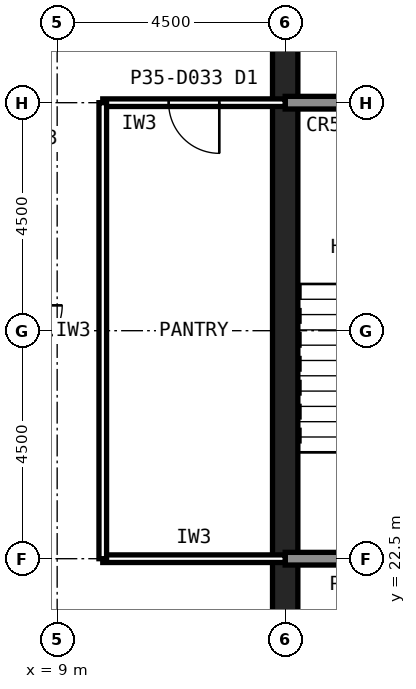
"""IFC4 building model, lengths in metres.
Left out: names, types, materials, properties, quantities, classifications, styles, units other than length and angle.
Written with IfcOpenShell. Run it as: python <this file> out.ifc"""

import sys

from ifc_helpers import new_model, si_unit, direction, frame, frame_2d, origin, place, context, subcontext, project, spatial, rectangle, extrude, element, fill, save


model = new_model("IFC4")
c1 = context("Model", 3, precision=1e-05, world=origin(), true_north=direction((0.0, 1.0)))
c2 = subcontext(c1, "Body", "Model", "MODEL_VIEW")
j1 = project(units=[si_unit("LENGTHUNIT", "METRE"), si_unit("PLANEANGLEUNIT", "RADIAN")], contexts=[c1])
p1 = place(None, origin())
s1 = spatial("IfcSite", under=j1, at=p1, CompositionType="ELEMENT")
p2 = place(p1, origin())
s2 = spatial("IfcBuilding", under=s1, at=p2, CompositionType="ELEMENT")
p3 = place(p2, frame((0.0, 0.0, 151.6)))
s3 = spatial("IfcBuildingStorey", under=s2, at=p3, CompositionType="ELEMENT", Elevation=151.6)
p4 = place(p3, frame((13.5, 40.5, 0.0), z_axis=(0.0, 0.0, 1.0), x_axis=(0.0, -1.0, 0.0)))
e1 = element("IfcWall", 1, at=p4, inside=s3, PredefinedType="SHEAR", context=c2, shape_type="SweptSolid", body=[
    extrude(rectangle(XDim=27.0, YDim=0.5, at=frame_2d((13.5, 0.0))), origin(), (0.0, 0.0, 1.0), 4.0),
])
p5 = place(p4, frame((19.65, 0.0, 0.0)))
e2 = element("IfcOpeningElement", 2, at=p5, cuts=e1, PredefinedType="OPENING", context=c2, shape_type="SweptSolid", body=[
    extrude(rectangle(XDim=1.2, YDim=2.1, at=frame_2d((0.6, 1.05))), frame((0.0, 0.26, 0.0), z_axis=(0.0, -1.0, 0.0), x_axis=(1.0, 0.0, 0.0)), (0.0, 0.0, 1.0), 0.52),
])
p6 = place(p4, frame((5.85, 0.0, 0.0)))
e3 = element("IfcOpeningElement", 3, at=p6, cuts=e1, PredefinedType="OPENING", context=c2, shape_type="SweptSolid", body=[
    extrude(rectangle(XDim=1.8, YDim=2.1, at=frame_2d((0.9, 1.05))), frame((0.0, 0.26, 0.0), z_axis=(0.0, -1.0, 0.0), x_axis=(1.0, 0.0, 0.0)), (0.0, 0.0, 1.0), 0.52),
])
p7 = place(p3, frame((13.5, 22.5, 0.0), z_axis=(0.0, 0.0, 1.0), x_axis=(1.0, 0.0, 0.0)))
e4 = element("IfcWall", 4, at=p7, inside=s3, PredefinedType="SOLIDWALL", context=c2, shape_type="SweptSolid", body=[
    extrude(rectangle(XDim=27.0, YDim=0.25, at=frame_2d((13.5, 0.0))), origin(), (0.0, 0.0, 1.0), 3.84),
])
p8 = place(p7, frame((1.65, 0.0, 0.0)))
e5 = element("IfcOpeningElement", 5, at=p8, cuts=e4, PredefinedType="OPENING", context=c2, shape_type="SweptSolid", body=[
    extrude(rectangle(XDim=1.2, YDim=2.1, at=frame_2d((0.6, 1.05))), frame((0.0, 0.135, 0.0), z_axis=(0.0, -1.0, 0.0), x_axis=(1.0, 0.0, 0.0)), (0.0, 0.0, 1.0), 0.27),
])
p9 = place(p7, frame((6.025, 0.0, 0.0)))
e6 = element("IfcOpeningElement", 6, at=p9, cuts=e4, PredefinedType="OPENING", context=c2, shape_type="SweptSolid", body=[
    extrude(rectangle(XDim=1.0, YDim=2.1, at=frame_2d((0.5, 1.05))), frame((0.0, 0.135, 0.0), z_axis=(0.0, -1.0, 0.0), x_axis=(1.0, 0.0, 0.0)), (0.0, 0.0, 1.0), 0.27),
])
p10 = place(p7, frame((10.525, 0.0, 0.0)))
e7 = element("IfcOpeningElement", 7, at=p10, cuts=e4, PredefinedType="OPENING", context=c2, shape_type="SweptSolid", body=[
    extrude(rectangle(XDim=1.0, YDim=2.1, at=frame_2d((0.5, 1.05))), frame((0.0, 0.135, 0.0), z_axis=(0.0, -1.0, 0.0), x_axis=(1.0, 0.0, 0.0)), (0.0, 0.0, 1.0), 0.27),
])
p11 = place(p7, frame((19.75, 0.0, 0.0)))
e8 = element("IfcOpeningElement", 8, at=p11, cuts=e4, PredefinedType="OPENING", context=c2, shape_type="SweptSolid", body=[
    extrude(rectangle(XDim=1.0, YDim=2.1, at=frame_2d((0.5, 1.05))), frame((0.0, 0.135, 0.0), z_axis=(0.0, -1.0, 0.0), x_axis=(1.0, 0.0, 0.0)), (0.0, 0.0, 1.0), 0.27),
])
p12 = place(p7, frame((15.05, 0.0, 0.0)))
e9 = element("IfcOpeningElement", 9, at=p12, cuts=e4, PredefinedType="OPENING", context=c2, shape_type="SweptSolid", body=[
    extrude(rectangle(XDim=1.4, YDim=2.4, at=frame_2d((0.7, 1.2))), frame((0.0, 0.135, 0.0), z_axis=(0.0, -1.0, 0.0), x_axis=(1.0, 0.0, 0.0)), (0.0, 0.0, 1.0), 0.27),
])
p13 = place(p3, frame((13.5, 31.5, 0.0), z_axis=(0.0, 0.0, 1.0), x_axis=(1.0, 0.0, 0.0)))
e10 = element("IfcWall", 10, at=p13, inside=s3, PredefinedType="SOLIDWALL", context=c2, shape_type="SweptSolid", body=[
    extrude(rectangle(XDim=27.0, YDim=0.25, at=frame_2d((13.5, 0.0))), origin(), (0.0, 0.0, 1.0), 3.84),
])
p14 = place(p13, frame((24.15, 0.0, 0.0)))
e11 = element("IfcOpeningElement", 11, at=p14, cuts=e10, PredefinedType="OPENING", context=c2, shape_type="SweptSolid", body=[
    extrude(rectangle(XDim=1.2, YDim=2.1, at=frame_2d((0.6, 1.05))), frame((0.0, 0.135, 0.0), z_axis=(0.0, -1.0, 0.0), x_axis=(1.0, 0.0, 0.0)), (0.0, 0.0, 1.0), 0.27),
])
p15 = place(p13, frame((15.3, 0.0, 0.0)))
e12 = element("IfcOpeningElement", 12, at=p15, cuts=e10, PredefinedType="OPENING", context=c2, shape_type="SweptSolid", body=[
    extrude(rectangle(XDim=0.9, YDim=2.1, at=frame_2d((0.45, 1.05))), frame((0.0, 0.135, 0.0), z_axis=(0.0, -1.0, 0.0), x_axis=(1.0, 0.0, 0.0)), (0.0, 0.0, 1.0), 0.27),
])
p16 = place(p13, frame((19.8, 0.0, 0.0)))
e13 = element("IfcOpeningElement", 13, at=p16, cuts=e10, PredefinedType="OPENING", context=c2, shape_type="SweptSolid", body=[
    extrude(rectangle(XDim=0.9, YDim=2.1, at=frame_2d((0.45, 1.05))), frame((0.0, 0.135, 0.0), z_axis=(0.0, -1.0, 0.0), x_axis=(1.0, 0.0, 0.0)), (0.0, 0.0, 1.0), 0.27),
])
p17 = place(p3, frame((9.9, 22.5, 0.0), z_axis=(0.0, 0.0, 1.0), x_axis=(1.0, 0.0, 0.0)))
e14 = element("IfcWall", 14, at=p17, inside=s3, PredefinedType="PARTITIONING", context=c2, shape_type="SweptSolid", body=[
    extrude(rectangle(XDim=3.6, YDim=0.15, at=frame_2d((1.8, 0.0))), origin(), (0.0, 0.0, 1.0), 2.989),
])
p18 = place(p3, frame((13.5, 31.5, 0.0), z_axis=(0.0, 0.0, 1.0), x_axis=(-1.0, 0.0, 0.0)))
e15 = element("IfcWall", 15, at=p18, inside=s3, PredefinedType="PARTITIONING", context=c2, shape_type="SweptSolid", body=[
    extrude(rectangle(XDim=3.6, YDim=0.15, at=frame_2d((1.8, 0.0))), origin(), (0.0, 0.0, 1.0), 2.989),
])
p19 = place(p18, frame((1.3, 0.0, 0.0)))
e16 = element("IfcOpeningElement", 16, at=p19, cuts=e15, PredefinedType="OPENING", context=c2, shape_type="SweptSolid", body=[
    extrude(rectangle(XDim=1.0, YDim=2.1, at=frame_2d((0.5, 1.05))), frame((0.0, 0.085, 0.0), z_axis=(0.0, -1.0, 0.0), x_axis=(1.0, 0.0, 0.0)), (0.0, 0.0, 1.0), 0.17),
])
p20 = place(p3, frame((9.9, 31.5, 0.0), z_axis=(0.0, 0.0, 1.0), x_axis=(0.0, -1.0, 0.0)))
e17 = element("IfcWall", 17, at=p20, inside=s3, PredefinedType="PARTITIONING", context=c2, shape_type="SweptSolid", body=[
    extrude(rectangle(XDim=9.0, YDim=0.15, at=frame_2d((4.5, 0.0))), origin(), (0.0, 0.0, 1.0), 3.84),
])
p21 = place(p19, origin())
e18 = element("IfcDoor", 18, at=p21, inside=s3, OperationType="SINGLE_SWING_LEFT", PredefinedType="DOOR", context=c2, shape_type="SweptSolid", body=[
    extrude(rectangle(XDim=1.0, YDim=2.1, at=frame_2d((0.5, 1.05))), frame((0.0, 0.025, 0.0), z_axis=(0.0, -1.0, 0.0), x_axis=(1.0, 0.0, 0.0)), (0.0, 0.0, 1.0), 0.05),
])
fill(e16, e18)
save(model, sys.argv[1])
